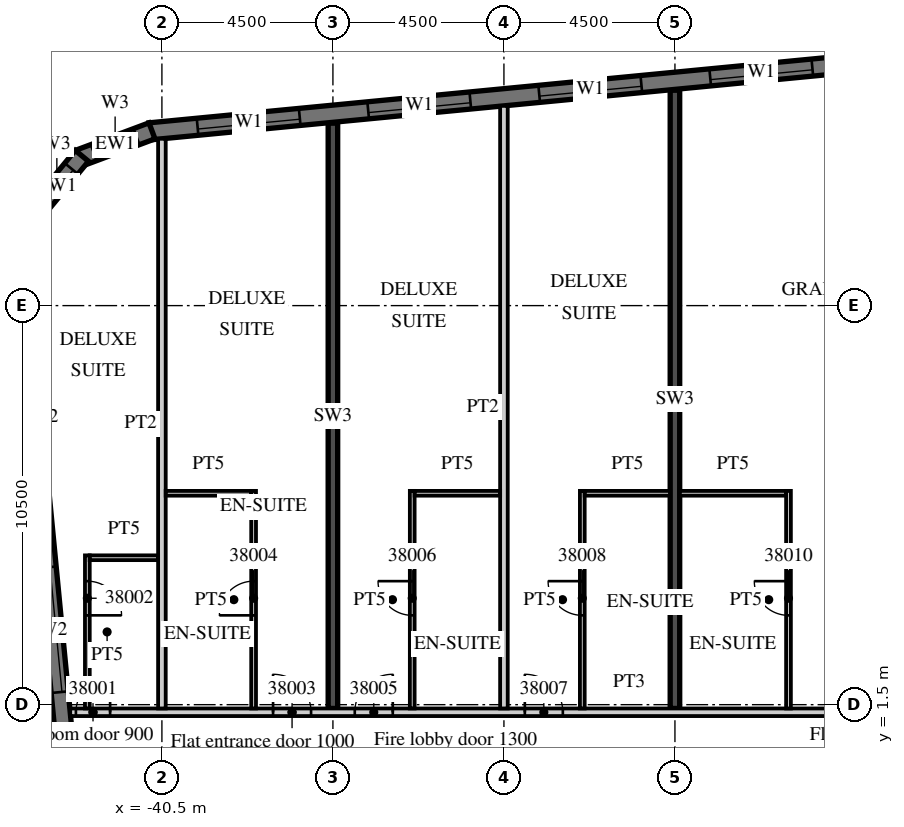
"""IFC4 building model, lengths in metres.
Left out: names, types, materials, properties, quantities, classifications, styles, units other than length and angle.
Written with IfcOpenShell. Run it as: python <this file> out.ifc"""

import sys

from ifc_helpers import new_model, si_unit, direction, frame, frame_2d, origin, place, context, subcontext, project, spatial, polyline, rectangle, outline, extrude, element, fill, save


model = new_model("IFC4")
c1 = context("Model", 3, precision=1e-05, world=origin(), true_north=direction((0.0, 1.0)))
c2 = subcontext(c1, "Body", "Model", "MODEL_VIEW")
j1 = project(units=[si_unit("LENGTHUNIT", "METRE"), si_unit("PLANEANGLEUNIT", "RADIAN")], contexts=[c1])
p1 = place(None, origin())
s1 = spatial("IfcSite", under=j1, at=p1, CompositionType="ELEMENT")
p2 = place(p1, origin())
s2 = spatial("IfcBuilding", under=s1, at=p2, CompositionType="ELEMENT")
p3 = place(p2, frame((0.0, 0.0, 166.9)))
s3 = spatial("IfcBuildingStorey", under=s2, at=p3, CompositionType="ELEMENT", Elevation=166.9)
p4 = place(p3, frame((-36.0, 1.4, 0.0), z_axis=(0.0, 0.0, 1.0), x_axis=(0.0, 1.0, 0.0)))
e1 = element("IfcWall", 1, at=p4, inside=s3, PredefinedType="SHEAR", context=c2, shape_type="SweptSolid", body=[
    extrude(rectangle(XDim=15.401, YDim=0.25, at=frame_2d((7.701, 0.0))), origin(), (0.0, 0.0, 1.0), 3.3),
])
p5 = place(p3, frame((-27.0, 1.4, 0.0), z_axis=(0.0, 0.0, 1.0), x_axis=(0.0, 1.0, 0.0)))
e2 = element("IfcWall", 2, at=p5, inside=s3, PredefinedType="SHEAR", context=c2, shape_type="SweptSolid", body=[
    extrude(rectangle(XDim=16.268, YDim=0.25, at=frame_2d((8.134, 0.0))), origin(), (0.0, 0.0, 1.0), 3.3),
])
p6 = place(p3, frame((-44.214, 12.466, 0.0), z_axis=(0.0, 0.0, 1.0), x_axis=(0.095847314626, -0.995396047952, 0.0)))
e3 = element("IfcWall", 3, at=p6, inside=s3, PredefinedType="SOLIDWALL", context=c2, shape_type="SweptSolid", body=[
    extrude(rectangle(XDim=34.0, YDim=0.45, at=frame_2d((17.0, 0.0))), origin(), (0.0, 0.0, 1.0), 3.02),
])
p7 = place(p6, frame((2.865, 0.0, 0.45)))
e4 = element("IfcOpeningElement", 4, at=p7, cuts=e3, PredefinedType="OPENING", context=c2, shape_type="SweptSolid", body=[
    extrude(rectangle(XDim=3.3, YDim=2.25, at=frame_2d((1.65, 1.125))), frame((0.0, 0.235, 0.0), z_axis=(0.0, -1.0, 0.0), x_axis=(1.0, 0.0, 0.0)), (0.0, 0.0, 1.0), 0.47),
])
p8 = place(p6, frame((7.386, 0.0, 0.45)))
e5 = element("IfcOpeningElement", 5, at=p8, cuts=e3, PredefinedType="OPENING", context=c2, shape_type="SweptSolid", body=[
    extrude(rectangle(XDim=3.3, YDim=2.25, at=frame_2d((1.65, 1.125))), frame((0.0, 0.235, 0.0), z_axis=(0.0, -1.0, 0.0), x_axis=(1.0, 0.0, 0.0)), (0.0, 0.0, 1.0), 0.47),
])
p9 = place(p3, frame((13.521, 21.817, 0.0), z_axis=(0.0, 0.0, 1.0), x_axis=(-0.995396508751, -0.095842529008, 0.0)))
e6 = element("IfcWall", 6, at=p9, inside=s3, PredefinedType="SOLIDWALL", context=c2, shape_type="SweptSolid", body=[
    extrude(rectangle(XDim=54.591, YDim=0.45, at=frame_2d((27.296, 0.0))), origin(), (0.0, 0.0, 1.0), 3.02),
])
p10 = place(p9, frame((0.91, 0.0, 0.45)))
e7 = element("IfcOpeningElement", 7, at=p10, cuts=e6, PredefinedType="OPENING", context=c2, shape_type="SweptSolid", body=[
    extrude(rectangle(XDim=2.7, YDim=2.25, at=frame_2d((1.35, 1.125))), frame((0.0, 0.235, 0.0), z_axis=(0.0, -1.0, 0.0), x_axis=(1.0, 0.0, 0.0)), (0.0, 0.0, 1.0), 0.47),
])
p11 = place(p9, frame((5.431, 0.0, 0.45)))
e8 = element("IfcOpeningElement", 8, at=p11, cuts=e6, PredefinedType="OPENING", context=c2, shape_type="SweptSolid", body=[
    extrude(rectangle(XDim=2.7, YDim=2.25, at=frame_2d((1.35, 1.125))), frame((0.0, 0.235, 0.0), z_axis=(0.0, -1.0, 0.0), x_axis=(1.0, 0.0, 0.0)), (0.0, 0.0, 1.0), 0.47),
])
p12 = place(p9, frame((9.952, 0.0, 0.45)))
e9 = element("IfcOpeningElement", 9, at=p12, cuts=e6, PredefinedType="OPENING", context=c2, shape_type="SweptSolid", body=[
    extrude(rectangle(XDim=2.7, YDim=2.25, at=frame_2d((1.35, 1.125))), frame((0.0, 0.235, 0.0), z_axis=(0.0, -1.0, 0.0), x_axis=(1.0, 0.0, 0.0)), (0.0, 0.0, 1.0), 0.47),
])
p13 = place(p9, frame((14.473, 0.0, 0.45)))
e10 = element("IfcOpeningElement", 10, at=p13, cuts=e6, PredefinedType="OPENING", context=c2, shape_type="SweptSolid", body=[
    extrude(rectangle(XDim=2.7, YDim=2.25, at=frame_2d((1.35, 1.125))), frame((0.0, 0.235, 0.0), z_axis=(0.0, -1.0, 0.0), x_axis=(1.0, 0.0, 0.0)), (0.0, 0.0, 1.0), 0.47),
])
p14 = place(p9, frame((18.994, 0.0, 0.45)))
e11 = element("IfcOpeningElement", 11, at=p14, cuts=e6, PredefinedType="OPENING", context=c2, shape_type="SweptSolid", body=[
    extrude(rectangle(XDim=2.7, YDim=2.25, at=frame_2d((1.35, 1.125))), frame((0.0, 0.235, 0.0), z_axis=(0.0, -1.0, 0.0), x_axis=(1.0, 0.0, 0.0)), (0.0, 0.0, 1.0), 0.47),
])
p15 = place(p9, frame((23.514, 0.0, 0.45)))
e12 = element("IfcOpeningElement", 12, at=p15, cuts=e6, PredefinedType="OPENING", context=c2, shape_type="SweptSolid", body=[
    extrude(rectangle(XDim=2.7, YDim=2.25, at=frame_2d((1.35, 1.125))), frame((0.0, 0.235, 0.0), z_axis=(0.0, -1.0, 0.0), x_axis=(1.0, 0.0, 0.0)), (0.0, 0.0, 1.0), 0.47),
])
p16 = place(p9, frame((28.035, 0.0, 0.45)))
e13 = element("IfcOpeningElement", 13, at=p16, cuts=e6, PredefinedType="OPENING", context=c2, shape_type="SweptSolid", body=[
    extrude(rectangle(XDim=2.7, YDim=2.25, at=frame_2d((1.35, 1.125))), frame((0.0, 0.235, 0.0), z_axis=(0.0, -1.0, 0.0), x_axis=(1.0, 0.0, 0.0)), (0.0, 0.0, 1.0), 0.47),
])
p17 = place(p9, frame((32.556, 0.0, 0.45)))
e14 = element("IfcOpeningElement", 14, at=p17, cuts=e6, PredefinedType="OPENING", context=c2, shape_type="SweptSolid", body=[
    extrude(rectangle(XDim=2.7, YDim=2.25, at=frame_2d((1.35, 1.125))), frame((0.0, 0.235, 0.0), z_axis=(0.0, -1.0, 0.0), x_axis=(1.0, 0.0, 0.0)), (0.0, 0.0, 1.0), 0.47),
])
p18 = place(p9, frame((37.077, 0.0, 0.45)))
e15 = element("IfcOpeningElement", 15, at=p18, cuts=e6, PredefinedType="OPENING", context=c2, shape_type="SweptSolid", body=[
    extrude(rectangle(XDim=2.7, YDim=2.25, at=frame_2d((1.35, 1.125))), frame((0.0, 0.235, 0.0), z_axis=(0.0, -1.0, 0.0), x_axis=(1.0, 0.0, 0.0)), (0.0, 0.0, 1.0), 0.47),
])
p19 = place(p9, frame((41.598, 0.0, 0.45)))
e16 = element("IfcOpeningElement", 16, at=p19, cuts=e6, PredefinedType="OPENING", context=c2, shape_type="SweptSolid", body=[
    extrude(rectangle(XDim=2.7, YDim=2.25, at=frame_2d((1.35, 1.125))), frame((0.0, 0.235, 0.0), z_axis=(0.0, -1.0, 0.0), x_axis=(1.0, 0.0, 0.0)), (0.0, 0.0, 1.0), 0.47),
])
p20 = place(p9, frame((46.118, 0.0, 0.45)))
e17 = element("IfcOpeningElement", 17, at=p20, cuts=e6, PredefinedType="OPENING", context=c2, shape_type="SweptSolid", body=[
    extrude(rectangle(XDim=2.7, YDim=2.25, at=frame_2d((1.35, 1.125))), frame((0.0, 0.235, 0.0), z_axis=(0.0, -1.0, 0.0), x_axis=(1.0, 0.0, 0.0)), (0.0, 0.0, 1.0), 0.47),
])
p21 = place(p9, frame((50.629, 0.0, 0.45)))
e18 = element("IfcOpeningElement", 18, at=p21, cuts=e6, PredefinedType="OPENING", context=c2, shape_type="SweptSolid", body=[
    extrude(rectangle(XDim=2.7, YDim=2.25, at=frame_2d((1.35, 1.125))), frame((0.0, 0.235, 0.0), z_axis=(0.0, -1.0, 0.0), x_axis=(1.0, 0.0, 0.0)), (0.0, 0.0, 1.0), 0.47),
])
p22 = place(p3, frame((-40.761, 16.598, 0.0), z_axis=(0.0, 0.0, 1.0), x_axis=(-0.936677599948, -0.350192909346, 0.0)))
e19 = element("IfcWall", 19, at=p22, inside=s3, PredefinedType="SOLIDWALL", context=c2, shape_type="SweptSolid", body=[
    extrude(outline(polyline([(0.0, -0.225), (2.071, -0.225), (1.95, 0.225), (0.121, 0.225), (0.0, -0.225)])), origin(), (0.0, 0.0, 1.0), 3.02),
])
p23 = place(p22, frame((0.435, 0.0, 0.45)))
e20 = element("IfcOpeningElement", 20, at=p23, cuts=e19, PredefinedType="OPENING", context=c2, shape_type="SweptSolid", body=[
    extrude(rectangle(XDim=1.2, YDim=2.25, at=frame_2d((0.6, 1.125))), frame((0.0, 0.235, 0.0), z_axis=(0.0, -1.0, 0.0), x_axis=(1.0, 0.0, 0.0)), (0.0, 0.0, 1.0), 0.47),
])
p24 = place(p3, frame((-42.606, 15.941, 0.0), z_axis=(0.0, 0.0, 1.0), x_axis=(-0.636116318187, -0.771593176315, 0.0)))
e21 = element("IfcWall", 21, at=p24, inside=s3, PredefinedType="SOLIDWALL", context=c2, shape_type="SweptSolid", body=[
    extrude(outline(polyline([(0.0, -0.225), (2.071, -0.225), (1.95, 0.225), (0.121, 0.225), (0.0, -0.225)])), origin(), (0.0, 0.0, 1.0), 3.02),
])
p25 = place(p24, frame((0.435, 0.0, 0.45)))
e22 = element("IfcOpeningElement", 22, at=p25, cuts=e21, PredefinedType="OPENING", context=c2, shape_type="SweptSolid", body=[
    extrude(rectangle(XDim=1.2, YDim=2.25, at=frame_2d((0.6, 1.125))), frame((0.0, 0.235, 0.0), z_axis=(0.0, -1.0, 0.0), x_axis=(1.0, 0.0, 0.0)), (0.0, 0.0, 1.0), 0.47),
])
p26 = place(p3, frame((-42.913, 1.3, 0.0), z_axis=(0.0, 0.0, 1.0), x_axis=(1.0, 0.0, 0.0)))
e23 = element("IfcWall", 23, at=p26, inside=s3, PredefinedType="PARTITIONING", context=c2, shape_type="SweptSolid", body=[
    extrude(rectangle(XDim=29.413, YDim=0.2, at=frame_2d((14.707, 0.0))), origin(), (0.0, 0.0, 1.0), 3.02),
])
p27 = place(p26, frame((0.15, 0.0, 0.0)))
e24 = element("IfcOpeningElement", 24, at=p27, cuts=e23, PredefinedType="OPENING", context=c2, shape_type="SweptSolid", body=[
    extrude(rectangle(XDim=0.9, YDim=2.1, at=frame_2d((0.45, 1.05))), frame((0.0, 0.11, 0.0), z_axis=(0.0, -1.0, 0.0), x_axis=(1.0, 0.0, 0.0)), (0.0, 0.0, 1.0), 0.22),
])
p28 = place(p26, frame((5.338, 0.0, 0.0)))
e25 = element("IfcOpeningElement", 25, at=p28, cuts=e23, PredefinedType="OPENING", context=c2, shape_type="SweptSolid", body=[
    extrude(rectangle(XDim=1.0, YDim=2.1, at=frame_2d((0.5, 1.05))), frame((0.0, 0.11, 0.0), z_axis=(0.0, -1.0, 0.0), x_axis=(1.0, 0.0, 0.0)), (0.0, 0.0, 1.0), 0.22),
])
p29 = place(p26, frame((7.488, 0.0, 0.0)))
e26 = element("IfcOpeningElement", 26, at=p29, cuts=e23, PredefinedType="OPENING", context=c2, shape_type="SweptSolid", body=[
    extrude(rectangle(XDim=1.0, YDim=2.1, at=frame_2d((0.5, 1.05))), frame((0.0, 0.11, 0.0), z_axis=(0.0, -1.0, 0.0), x_axis=(1.0, 0.0, 0.0)), (0.0, 0.0, 1.0), 0.22),
])
p30 = place(p26, frame((11.963, 0.0, 0.0)))
e27 = element("IfcOpeningElement", 27, at=p30, cuts=e23, PredefinedType="OPENING", context=c2, shape_type="SweptSolid", body=[
    extrude(rectangle(XDim=1.0, YDim=2.1, at=frame_2d((0.5, 1.05))), frame((0.0, 0.11, 0.0), z_axis=(0.0, -1.0, 0.0), x_axis=(1.0, 0.0, 0.0)), (0.0, 0.0, 1.0), 0.22),
])
p31 = place(p26, frame((21.275, 0.0, 0.0)))
e28 = element("IfcOpeningElement", 28, at=p31, cuts=e23, PredefinedType="OPENING", context=c2, shape_type="SweptSolid", body=[
    extrude(rectangle(XDim=1.2, YDim=2.1, at=frame_2d((0.6, 1.05))), frame((0.0, 0.11, 0.0), z_axis=(0.0, -1.0, 0.0), x_axis=(1.0, 0.0, 0.0)), (0.0, 0.0, 1.0), 0.22),
])
p32 = place(p26, frame((27.838, 0.0, 0.0)))
e29 = element("IfcOpeningElement", 29, at=p32, cuts=e23, PredefinedType="OPENING", context=c2, shape_type="SweptSolid", body=[
    extrude(rectangle(XDim=1.0, YDim=2.1, at=frame_2d((0.5, 1.05))), frame((0.0, 0.11, 0.0), z_axis=(0.0, -1.0, 0.0), x_axis=(1.0, 0.0, 0.0)), (0.0, 0.0, 1.0), 0.22),
])
p33 = place(p3, frame((-40.5, 1.4, 0.0), z_axis=(0.0, 0.0, 1.0), x_axis=(0.0, 1.0, 0.0)))
e30 = element("IfcWall", 30, at=p33, inside=s3, PredefinedType="PARTITIONING", context=c2, shape_type="SweptSolid", body=[
    extrude(rectangle(XDim=14.99, YDim=0.2, at=frame_2d((7.495, 0.0))), origin(), (0.0, 0.0, 1.0), 3.02),
])
p34 = place(p3, frame((-42.462, 1.4, 0.0), z_axis=(0.0, 0.0, 1.0), x_axis=(0.0, 1.0, 0.0)))
e31 = element("IfcWall", 31, at=p34, inside=s3, PredefinedType="PARTITIONING", context=c2, shape_type="SweptSolid", body=[
    extrude(rectangle(XDim=4.028, YDim=0.125, at=frame_2d((2.014, 0.0))), origin(), (0.0, 0.0, 1.0), 3.02),
])
p35 = place(p34, frame((2.45, 0.0, 0.0)))
e32 = element("IfcOpeningElement", 32, at=p35, cuts=e31, PredefinedType="OPENING", context=c2, shape_type="SweptSolid", body=[
    extrude(rectangle(XDim=0.9, YDim=2.1, at=frame_2d((0.45, 1.05))), frame((0.0, 0.073, 0.0), z_axis=(0.0, -1.0, 0.0), x_axis=(1.0, 0.0, 0.0)), (0.0, 0.0, 1.0), 0.145),
])
p36 = place(p3, frame((-42.4, 5.366, 0.0), z_axis=(0.0, 0.0, 1.0), x_axis=(1.0, 0.0, 0.0)))
e33 = element("IfcWall", 33, at=p36, inside=s3, PredefinedType="PARTITIONING", context=c2, shape_type="SweptSolid", body=[
    extrude(rectangle(XDim=1.8, YDim=0.125, at=frame_2d((0.9, 0.0))), origin(), (0.0, 0.0, 1.0), 3.02),
])
p37 = place(p3, frame((-38.087, 1.4, 0.0), z_axis=(0.0, 0.0, 1.0), x_axis=(0.0, 1.0, 0.0)))
e34 = element("IfcWall", 34, at=p37, inside=s3, PredefinedType="PARTITIONING", context=c2, shape_type="SweptSolid", body=[
    extrude(rectangle(XDim=5.725, YDim=0.125, at=frame_2d((2.863, 0.0))), origin(), (0.0, 0.0, 1.0), 3.02),
])
p38 = place(p37, frame((2.45, 0.0, 0.0)))
e35 = element("IfcOpeningElement", 35, at=p38, cuts=e34, PredefinedType="OPENING", context=c2, shape_type="SweptSolid", body=[
    extrude(rectangle(XDim=0.9, YDim=2.1, at=frame_2d((0.45, 1.05))), frame((0.0, 0.073, 0.0), z_axis=(0.0, -1.0, 0.0), x_axis=(1.0, 0.0, 0.0)), (0.0, 0.0, 1.0), 0.145),
])
p39 = place(p3, frame((-40.4, 7.062, 0.0), z_axis=(0.0, 0.0, 1.0), x_axis=(1.0, 0.0, 0.0)))
e36 = element("IfcWall", 36, at=p39, inside=s3, PredefinedType="PARTITIONING", context=c2, shape_type="SweptSolid", body=[
    extrude(rectangle(XDim=2.25, YDim=0.125, at=frame_2d((1.125, 0.0))), origin(), (0.0, 0.0, 1.0), 3.02),
])
p40 = place(p3, frame((-31.5, 1.4, 0.0), z_axis=(0.0, 0.0, 1.0), x_axis=(0.0, 1.0, 0.0)))
e37 = element("IfcWall", 37, at=p40, inside=s3, PredefinedType="PARTITIONING", context=c2, shape_type="SweptSolid", body=[
    extrude(rectangle(XDim=15.856, YDim=0.2, at=frame_2d((7.928, 0.0))), origin(), (0.0, 0.0, 1.0), 3.02),
])
p41 = place(p3, frame((-33.913, 1.4, 0.0), z_axis=(0.0, 0.0, 1.0), x_axis=(0.0, 1.0, 0.0)))
e38 = element("IfcWall", 38, at=p41, inside=s3, PredefinedType="PARTITIONING", context=c2, shape_type="SweptSolid", body=[
    extrude(rectangle(XDim=5.725, YDim=0.125, at=frame_2d((2.863, 0.0))), origin(), (0.0, 0.0, 1.0), 3.02),
])
p42 = place(p41, frame((2.45, 0.0, 0.0)))
e39 = element("IfcOpeningElement", 39, at=p42, cuts=e38, PredefinedType="OPENING", context=c2, shape_type="SweptSolid", body=[
    extrude(rectangle(XDim=0.9, YDim=2.1, at=frame_2d((0.45, 1.05))), frame((0.0, 0.073, 0.0), z_axis=(0.0, -1.0, 0.0), x_axis=(1.0, 0.0, 0.0)), (0.0, 0.0, 1.0), 0.145),
])
p43 = place(p3, frame((-33.85, 7.062, 0.0), z_axis=(0.0, 0.0, 1.0), x_axis=(1.0, 0.0, 0.0)))
e40 = element("IfcWall", 40, at=p43, inside=s3, PredefinedType="PARTITIONING", context=c2, shape_type="SweptSolid", body=[
    extrude(rectangle(XDim=2.25, YDim=0.125, at=frame_2d((1.125, 0.0))), origin(), (0.0, 0.0, 1.0), 3.02),
])
p44 = place(p3, frame((-29.438, 1.4, 0.0), z_axis=(0.0, 0.0, 1.0), x_axis=(0.0, 1.0, 0.0)))
e41 = element("IfcWall", 41, at=p44, inside=s3, PredefinedType="PARTITIONING", context=c2, shape_type="SweptSolid", body=[
    extrude(rectangle(XDim=5.725, YDim=0.125, at=frame_2d((2.863, 0.0))), origin(), (0.0, 0.0, 1.0), 3.02),
])
p45 = place(p44, frame((2.45, 0.0, 0.0)))
e42 = element("IfcOpeningElement", 42, at=p45, cuts=e41, PredefinedType="OPENING", context=c2, shape_type="SweptSolid", body=[
    extrude(rectangle(XDim=0.9, YDim=2.1, at=frame_2d((0.45, 1.05))), frame((0.0, 0.073, 0.0), z_axis=(0.0, -1.0, 0.0), x_axis=(1.0, 0.0, 0.0)), (0.0, 0.0, 1.0), 0.145),
])
p46 = place(p3, frame((-29.375, 7.062, 0.0), z_axis=(0.0, 0.0, 1.0), x_axis=(1.0, 0.0, 0.0)))
e43 = element("IfcWall", 43, at=p46, inside=s3, PredefinedType="PARTITIONING", context=c2, shape_type="SweptSolid", body=[
    extrude(rectangle(XDim=2.25, YDim=0.125, at=frame_2d((1.125, 0.0))), origin(), (0.0, 0.0, 1.0), 3.02),
])
p47 = place(p3, frame((-24.012, 1.4, 0.0), z_axis=(0.0, 0.0, 1.0), x_axis=(0.0, 1.0, 0.0)))
e44 = element("IfcWall", 44, at=p47, inside=s3, PredefinedType="PARTITIONING", context=c2, shape_type="SweptSolid", body=[
    extrude(rectangle(XDim=5.725, YDim=0.125, at=frame_2d((2.863, 0.0))), origin(), (0.0, 0.0, 1.0), 3.02),
])
p48 = place(p47, frame((2.45, 0.0, 0.0)))
e45 = element("IfcOpeningElement", 45, at=p48, cuts=e44, PredefinedType="OPENING", context=c2, shape_type="SweptSolid", body=[
    extrude(rectangle(XDim=0.9, YDim=2.1, at=frame_2d((0.45, 1.05))), frame((0.0, 0.073, 0.0), z_axis=(0.0, -1.0, 0.0), x_axis=(1.0, 0.0, 0.0)), (0.0, 0.0, 1.0), 0.145),
])
p49 = place(p3, frame((-26.875, 7.062, 0.0), z_axis=(0.0, 0.0, 1.0), x_axis=(1.0, 0.0, 0.0)))
e46 = element("IfcWall", 46, at=p49, inside=s3, PredefinedType="PARTITIONING", context=c2, shape_type="SweptSolid", body=[
    extrude(rectangle(XDim=2.8, YDim=0.125, at=frame_2d((1.4, 0.0))), origin(), (0.0, 0.0, 1.0), 3.02),
])
p50 = place(p8, origin())
e47 = element("IfcWindow", 47, at=p50, inside=s3, PartitioningType="SINGLE_PANEL", PredefinedType="WINDOW", context=c2, shape_type="SweptSolid", body=[
    extrude(rectangle(XDim=3.3, YDim=2.25, at=frame_2d((1.65, 1.125))), frame((0.0, 0.09, 0.0), z_axis=(0.0, -1.0, 0.0), x_axis=(1.0, 0.0, 0.0)), (0.0, 0.0, 1.0), 0.06),
])
fill(e5, e47)
p51 = place(p18, origin())
e48 = element("IfcWindow", 48, at=p51, inside=s3, PartitioningType="SINGLE_PANEL", PredefinedType="WINDOW", context=c2, shape_type="SweptSolid", body=[
    extrude(rectangle(XDim=2.7, YDim=2.25, at=frame_2d((1.35, 1.125))), frame((0.0, 0.09, 0.0), z_axis=(0.0, -1.0, 0.0), x_axis=(1.0, 0.0, 0.0)), (0.0, 0.0, 1.0), 0.06),
])
fill(e15, e48)
p52 = place(p19, origin())
e49 = element("IfcWindow", 49, at=p52, inside=s3, PartitioningType="SINGLE_PANEL", PredefinedType="WINDOW", context=c2, shape_type="SweptSolid", body=[
    extrude(rectangle(XDim=2.7, YDim=2.25, at=frame_2d((1.35, 1.125))), frame((0.0, 0.09, 0.0), z_axis=(0.0, -1.0, 0.0), x_axis=(1.0, 0.0, 0.0)), (0.0, 0.0, 1.0), 0.06),
])
fill(e16, e49)
p53 = place(p20, origin())
e50 = element("IfcWindow", 50, at=p53, inside=s3, PartitioningType="SINGLE_PANEL", PredefinedType="WINDOW", context=c2, shape_type="SweptSolid", body=[
    extrude(rectangle(XDim=2.7, YDim=2.25, at=frame_2d((1.35, 1.125))), frame((0.0, 0.09, 0.0), z_axis=(0.0, -1.0, 0.0), x_axis=(1.0, 0.0, 0.0)), (0.0, 0.0, 1.0), 0.06),
])
fill(e17, e50)
p54 = place(p21, origin())
e51 = element("IfcWindow", 51, at=p54, inside=s3, PartitioningType="SINGLE_PANEL", PredefinedType="WINDOW", context=c2, shape_type="SweptSolid", body=[
    extrude(rectangle(XDim=2.7, YDim=2.25, at=frame_2d((1.35, 1.125))), frame((0.0, 0.09, 0.0), z_axis=(0.0, -1.0, 0.0), x_axis=(1.0, 0.0, 0.0)), (0.0, 0.0, 1.0), 0.06),
])
fill(e18, e51)
p55 = place(p23, origin())
e52 = element("IfcWindow", 52, at=p55, inside=s3, PartitioningType="SINGLE_PANEL", PredefinedType="WINDOW", context=c2, shape_type="SweptSolid", body=[
    extrude(rectangle(XDim=1.2, YDim=2.25, at=frame_2d((0.6, 1.125))), frame((0.0, 0.09, 0.0), z_axis=(0.0, -1.0, 0.0), x_axis=(1.0, 0.0, 0.0)), (0.0, 0.0, 1.0), 0.06),
])
fill(e20, e52)
p56 = place(p25, origin())
e53 = element("IfcWindow", 53, at=p56, inside=s3, PartitioningType="SINGLE_PANEL", PredefinedType="WINDOW", context=c2, shape_type="SweptSolid", body=[
    extrude(rectangle(XDim=1.2, YDim=2.25, at=frame_2d((0.6, 1.125))), frame((0.0, 0.09, 0.0), z_axis=(0.0, -1.0, 0.0), x_axis=(1.0, 0.0, 0.0)), (0.0, 0.0, 1.0), 0.06),
])
fill(e22, e53)
p57 = place(p27, origin())
e54 = element("IfcDoor", 54, at=p57, inside=s3, OperationType="SINGLE_SWING_RIGHT", PredefinedType="DOOR", context=c2, shape_type="SweptSolid", body=[
    extrude(rectangle(XDim=0.9, YDim=2.1, at=frame_2d((0.45, 1.05))), frame((0.0, 0.025, 0.0), z_axis=(0.0, -1.0, 0.0), x_axis=(1.0, 0.0, 0.0)), (0.0, 0.0, 1.0), 0.05),
])
fill(e24, e54)
p58 = place(p35, origin())
e55 = element("IfcDoor", 55, at=p58, inside=s3, OperationType="SINGLE_SWING_LEFT", PredefinedType="DOOR", context=c2, shape_type="SweptSolid", body=[
    extrude(rectangle(XDim=0.9, YDim=2.1, at=frame_2d((0.45, 1.05))), frame((0.0, 0.025, 0.0), z_axis=(0.0, -1.0, 0.0), x_axis=(1.0, 0.0, 0.0)), (0.0, 0.0, 1.0), 0.05),
])
fill(e32, e55)
p59 = place(p28, origin())
e56 = element("IfcDoor", 56, at=p59, inside=s3, OperationType="SINGLE_SWING_LEFT", PredefinedType="DOOR", context=c2, shape_type="SweptSolid", body=[
    extrude(rectangle(XDim=1.0, YDim=2.1, at=frame_2d((0.5, 1.05))), frame((0.0, 0.025, 0.0), z_axis=(0.0, -1.0, 0.0), x_axis=(1.0, 0.0, 0.0)), (0.0, 0.0, 1.0), 0.05),
])
fill(e25, e56)
p60 = place(p38, origin())
e57 = element("IfcDoor", 57, at=p60, inside=s3, OperationType="SINGLE_SWING_LEFT", PredefinedType="DOOR", context=c2, shape_type="SweptSolid", body=[
    extrude(rectangle(XDim=0.9, YDim=2.1, at=frame_2d((0.45, 1.05))), frame((0.0, 0.025, 0.0), z_axis=(0.0, -1.0, 0.0), x_axis=(1.0, 0.0, 0.0)), (0.0, 0.0, 1.0), 0.05),
])
fill(e35, e57)
p61 = place(p29, origin())
e58 = element("IfcDoor", 58, at=p61, inside=s3, OperationType="SINGLE_SWING_RIGHT", PredefinedType="DOOR", context=c2, shape_type="SweptSolid", body=[
    extrude(rectangle(XDim=1.0, YDim=2.1, at=frame_2d((0.5, 1.05))), frame((0.0, 0.025, 0.0), z_axis=(0.0, -1.0, 0.0), x_axis=(1.0, 0.0, 0.0)), (0.0, 0.0, 1.0), 0.05),
])
fill(e26, e58)
p62 = place(p42, origin())
e59 = element("IfcDoor", 59, at=p62, inside=s3, OperationType="SINGLE_SWING_RIGHT", PredefinedType="DOOR", context=c2, shape_type="SweptSolid", body=[
    extrude(rectangle(XDim=0.9, YDim=2.1, at=frame_2d((0.45, 1.05))), frame((0.0, 0.025, 0.0), z_axis=(0.0, -1.0, 0.0), x_axis=(1.0, 0.0, 0.0)), (0.0, 0.0, 1.0), 0.05),
])
fill(e39, e59)
p63 = place(p30, origin())
e60 = element("IfcDoor", 60, at=p63, inside=s3, OperationType="SINGLE_SWING_LEFT", PredefinedType="DOOR", context=c2, shape_type="SweptSolid", body=[
    extrude(rectangle(XDim=1.0, YDim=2.1, at=frame_2d((0.5, 1.05))), frame((0.0, 0.025, 0.0), z_axis=(0.0, -1.0, 0.0), x_axis=(1.0, 0.0, 0.0)), (0.0, 0.0, 1.0), 0.05),
])
fill(e27, e60)
p64 = place(p45, origin())
e61 = element("IfcDoor", 61, at=p64, inside=s3, OperationType="SINGLE_SWING_RIGHT", PredefinedType="DOOR", context=c2, shape_type="SweptSolid", body=[
    extrude(rectangle(XDim=0.9, YDim=2.1, at=frame_2d((0.45, 1.05))), frame((0.0, 0.025, 0.0), z_axis=(0.0, -1.0, 0.0), x_axis=(1.0, 0.0, 0.0)), (0.0, 0.0, 1.0), 0.05),
])
fill(e42, e61)
p65 = place(p48, origin())
e62 = element("IfcDoor", 62, at=p65, inside=s3, OperationType="SINGLE_SWING_RIGHT", PredefinedType="DOOR", context=c2, shape_type="SweptSolid", body=[
    extrude(rectangle(XDim=0.9, YDim=2.1, at=frame_2d((0.45, 1.05))), frame((0.0, 0.025, 0.0), z_axis=(0.0, -1.0, 0.0), x_axis=(1.0, 0.0, 0.0)), (0.0, 0.0, 1.0), 0.05),
])
fill(e45, e62)
save(model, sys.argv[1])
